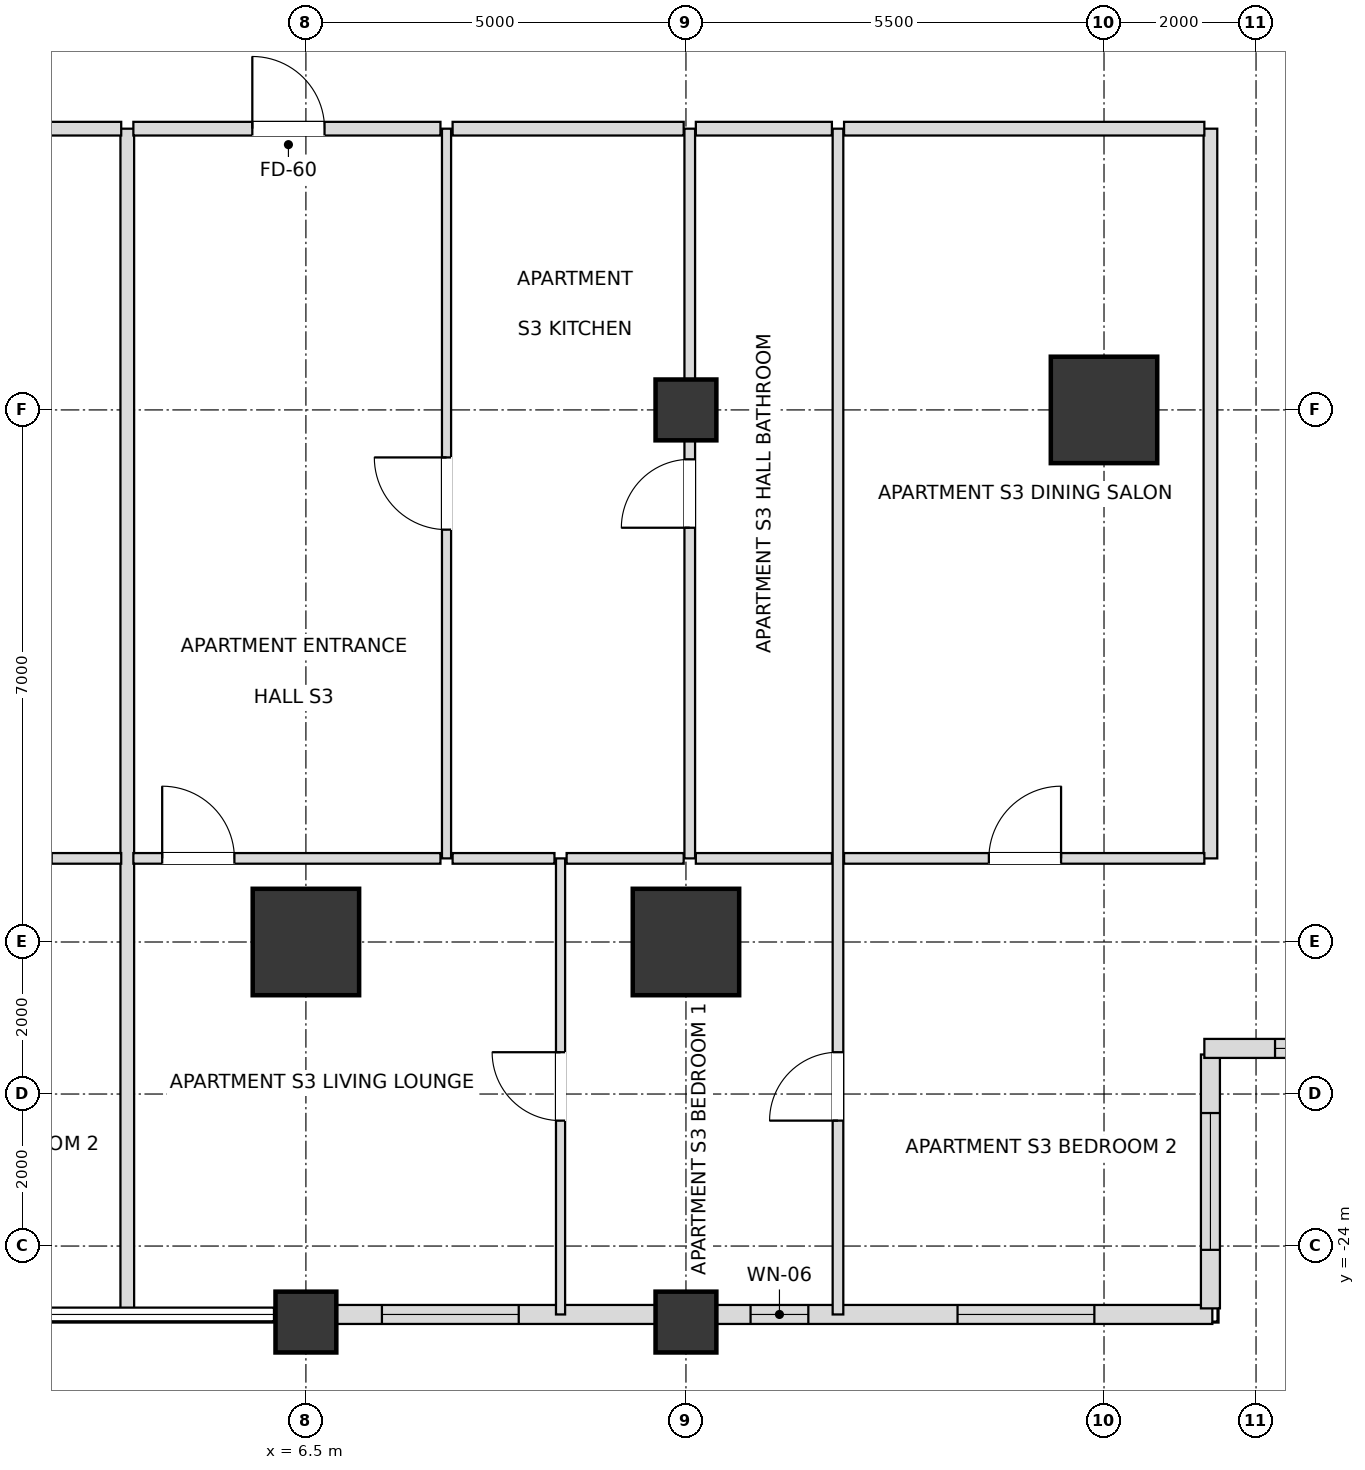
"""IFC4 building model, lengths in metres.
Left out: names, types, materials, properties, quantities, classifications, styles, units other than length and angle.
Written with IfcOpenShell. Run it as: python <this file> out.ifc"""

import sys

from ifc_helpers import new_model, si_unit, direction, frame, frame_2d, origin, origin_2d, place, context, subcontext, project, spatial, rectangle, extrude, element, fill, save


model = new_model("IFC4")
c1 = context("Model", 3, precision=1e-05, world=origin(), true_north=direction((0.0, 1.0)))
c2 = subcontext(c1, "Body", "Model", "MODEL_VIEW")
j1 = project(units=[si_unit("LENGTHUNIT", "METRE"), si_unit("PLANEANGLEUNIT", "RADIAN")], contexts=[c1])
p1 = place(None, origin())
s1 = spatial("IfcSite", under=j1, at=p1, CompositionType="ELEMENT")
p2 = place(p1, origin())
s2 = spatial("IfcBuilding", under=s1, at=p2, CompositionType="ELEMENT")
p3 = place(p2, frame((0.0, 0.0, 90.0)))
s3 = spatial("IfcBuildingStorey", under=s2, at=p3, CompositionType="ELEMENT", Elevation=90.0)
for number, where, z_axis, x_axis in (
    (1, (6.5, -20.0, 0.0), (0.0, 0.0, 1.0), (1.0, 0.0, 0.0)),
    (2, (11.5, -20.0, 0.0), (0.0, 0.0, 1.0), (1.0, 0.0, 0.0)),
    (3, (17.0, -13.0, 0.0), (0.0, 0.0, 1.0), (1.0, 0.0, 0.0)),
):
    element("IfcColumn", number, at=place(p3, frame(where, z_axis=z_axis, x_axis=x_axis)), inside=s3, PredefinedType="USERDEFINED", context=c2, shape_type="SweptSolid", body=[
        extrude(rectangle(XDim=1.4, YDim=1.4, at=origin_2d()), origin(), (0.0, 0.0, 1.0), 3.6),
    ])
for number, where, z_axis, x_axis in (
    (4, (11.5, -13.0, 0.0), (0.0, 0.0, 1.0), (1.0, 0.0, 0.0)),
    (5, (6.5, -25.0, 0.0), (0.0, 0.0, 1.0), (1.0, 0.0, 0.0)),
    (6, (11.5, -25.0, 0.0), (0.0, 0.0, 1.0), (1.0, 0.0, 0.0)),
):
    element("IfcColumn", number, at=place(p3, frame(where, z_axis=z_axis, x_axis=x_axis)), inside=s3, PredefinedType="COLUMN", context=c2, shape_type="SweptSolid", body=[
        extrude(rectangle(XDim=0.8, YDim=0.8, at=origin_2d()), origin(), (0.0, 0.0, 1.0), 3.6),
    ])
p4 = place(p3, frame((6.895, -24.9, 0.0), z_axis=(0.0, 0.0, 1.0), x_axis=(1.0, 0.0, 0.0)))
e7 = element("IfcWall", 7, at=p4, inside=s3, PredefinedType="SOLIDWALL", context=c2, shape_type="SweptSolid", body=[
    extrude(rectangle(XDim=4.21, YDim=0.25, at=frame_2d((2.105, 0.0))), origin(), (0.0, 0.0, 1.0), 2.59),
])
p5 = place(p4, frame((0.605, 0.0, 0.72)))
e8 = element("IfcOpeningElement", 8, at=p5, cuts=e7, PredefinedType="OPENING", context=c2, shape_type="SweptSolid", body=[
    extrude(rectangle(XDim=1.8, YDim=1.68, at=frame_2d((0.9, 0.84))), frame((0.0, 0.135, 0.0), z_axis=(0.0, -1.0, 0.0), x_axis=(1.0, 0.0, 0.0)), (0.0, 0.0, 1.0), 0.27),
])
p6 = place(p3, frame((11.895, -24.9, 0.0), z_axis=(0.0, 0.0, 1.0), x_axis=(1.0, 0.0, 0.0)))
e9 = element("IfcWall", 9, at=p6, inside=s3, PredefinedType="SOLIDWALL", context=c2, shape_type="SweptSolid", body=[
    extrude(rectangle(XDim=6.53, YDim=0.25, at=frame_2d((3.265, 0.0))), origin(), (0.0, 0.0, 1.0), 2.59),
])
p7 = place(p6, frame((0.455, 0.0, 0.72)))
e10 = element("IfcOpeningElement", 10, at=p7, cuts=e9, PredefinedType="OPENING", context=c2, shape_type="SweptSolid", body=[
    extrude(rectangle(XDim=0.76, YDim=1.68, at=frame_2d((0.38, 0.84))), frame((0.0, 0.135, 0.0), z_axis=(0.0, -1.0, 0.0), x_axis=(1.0, 0.0, 0.0)), (0.0, 0.0, 1.0), 0.27),
])
p8 = place(p6, frame((3.178, 0.0, 0.72)))
e11 = element("IfcOpeningElement", 11, at=p8, cuts=e9, PredefinedType="OPENING", context=c2, shape_type="SweptSolid", body=[
    extrude(rectangle(XDim=1.8, YDim=1.68, at=frame_2d((0.9, 0.84))), frame((0.0, 0.135, 0.0), z_axis=(0.0, -1.0, 0.0), x_axis=(1.0, 0.0, 0.0)), (0.0, 0.0, 1.0), 0.27),
])
p9 = place(p3, frame((18.4, -24.82, 0.0), z_axis=(0.0, 0.0, 1.0), x_axis=(0.0, 1.0, 0.0)))
e12 = element("IfcWall", 12, at=p9, inside=s3, PredefinedType="SOLIDWALL", context=c2, shape_type="SweptSolid", body=[
    extrude(rectangle(XDim=3.34, YDim=0.25, at=frame_2d((1.67, 0.0))), origin(), (0.0, 0.0, 1.0), 2.59),
])
p10 = place(p9, frame((0.77, 0.0, 0.72)))
e13 = element("IfcOpeningElement", 13, at=p10, cuts=e12, PredefinedType="OPENING", context=c2, shape_type="SweptSolid", body=[
    extrude(rectangle(XDim=1.8, YDim=1.68, at=frame_2d((0.9, 0.84))), frame((0.0, 0.135, 0.0), z_axis=(0.0, -1.0, 0.0), x_axis=(1.0, 0.0, 0.0)), (0.0, 0.0, 1.0), 0.27),
])
p11 = place(p3, frame((18.32, -21.4, 0.0), z_axis=(0.0, 0.0, 1.0), x_axis=(1.0, 0.0, 0.0)))
e14 = element("IfcWall", 14, at=p11, inside=s3, PredefinedType="SOLIDWALL", context=c2, shape_type="SweptSolid", body=[
    extrude(rectangle(XDim=3.66, YDim=0.25, at=frame_2d((1.83, 0.0))), origin(), (0.0, 0.0, 1.0), 2.59),
])
p12 = place(p11, frame((0.93, 0.0, 0.72)))
e15 = element("IfcOpeningElement", 15, at=p12, cuts=e14, PredefinedType="OPENING", context=c2, shape_type="SweptSolid", body=[
    extrude(rectangle(XDim=1.8, YDim=1.68, at=frame_2d((0.9, 0.84))), frame((0.0, 0.135, 0.0), z_axis=(0.0, -1.0, 0.0), x_axis=(1.0, 0.0, 0.0)), (0.0, 0.0, 1.0), 0.27),
])
p13 = place(p3, frame((4.15, -24.9, 0.0), z_axis=(0.0, 0.0, 1.0), x_axis=(0.0, 1.0, 0.0)))
e16 = element("IfcWall", 16, at=p13, inside=s3, PredefinedType="PARTITIONING", context=c2, shape_type="SweptSolid", body=[
    extrude(rectangle(XDim=15.6, YDim=0.18, at=frame_2d((7.8, 0.0))), origin(), (0.0, 0.0, 1.0), 2.736),
])
p14 = place(p3, frame((8.35, -18.9, 0.0), z_axis=(0.0, 0.0, 1.0), x_axis=(0.0, 1.0, 0.0)))
e17 = element("IfcWall", 17, at=p14, inside=s3, PredefinedType="PARTITIONING", context=c2, shape_type="SweptSolid", body=[
    extrude(rectangle(XDim=9.6, YDim=0.12, at=frame_2d((4.8, 0.0))), origin(), (0.0, 0.0, 1.0), 2.736),
])
p15 = place(p14, frame((4.325, 0.0, 0.0)))
e18 = element("IfcOpeningElement", 18, at=p15, cuts=e17, PredefinedType="OPENING", context=c2, shape_type="SweptSolid", body=[
    extrude(rectangle(XDim=0.95, YDim=2.1, at=frame_2d((0.475, 1.05))), frame((0.0, 0.07, 0.0), z_axis=(0.0, -1.0, 0.0), x_axis=(1.0, 0.0, 0.0)), (0.0, 0.0, 1.0), 0.14),
])
p16 = place(p3, frame((9.85, -24.9, 0.0), z_axis=(0.0, 0.0, 1.0), x_axis=(0.0, 1.0, 0.0)))
e19 = element("IfcWall", 19, at=p16, inside=s3, PredefinedType="PARTITIONING", context=c2, shape_type="SweptSolid", body=[
    extrude(rectangle(XDim=6.0, YDim=0.12, at=frame_2d((3.0, 0.0))), origin(), (0.0, 0.0, 1.0), 2.736),
])
p17 = place(p16, frame((2.55, 0.0, 0.0)))
e20 = element("IfcOpeningElement", 20, at=p17, cuts=e19, PredefinedType="OPENING", context=c2, shape_type="SweptSolid", body=[
    extrude(rectangle(XDim=0.9, YDim=2.1, at=frame_2d((0.45, 1.05))), frame((0.0, 0.07, 0.0), z_axis=(0.0, -1.0, 0.0), x_axis=(1.0, 0.0, 0.0)), (0.0, 0.0, 1.0), 0.14),
])
p18 = place(p3, frame((11.55, -18.9, 0.0), z_axis=(0.0, 0.0, 1.0), x_axis=(0.0, 1.0, 0.0)))
e21 = element("IfcWall", 21, at=p18, inside=s3, PredefinedType="PARTITIONING", context=c2, shape_type="SweptSolid", body=[
    extrude(rectangle(XDim=9.6, YDim=0.14, at=frame_2d((4.8, 0.0))), origin(), (0.0, 0.0, 1.0), 2.59),
])
p19 = place(p18, frame((4.35, 0.0, 0.0)))
e22 = element("IfcOpeningElement", 22, at=p19, cuts=e21, PredefinedType="OPENING", context=c2, shape_type="SweptSolid", body=[
    extrude(rectangle(XDim=0.9, YDim=2.1, at=frame_2d((0.45, 1.05))), frame((0.0, 0.08, 0.0), z_axis=(0.0, -1.0, 0.0), x_axis=(1.0, 0.0, 0.0)), (0.0, 0.0, 1.0), 0.16),
])
p20 = place(p3, frame((13.5, -24.9, 0.0), z_axis=(0.0, 0.0, 1.0), x_axis=(0.0, 1.0, 0.0)))
e23 = element("IfcWall", 23, at=p20, inside=s3, PredefinedType="PARTITIONING", context=c2, shape_type="SweptSolid", body=[
    extrude(rectangle(XDim=15.6, YDim=0.14, at=frame_2d((7.8, 0.0))), origin(), (0.0, 0.0, 1.0), 2.59),
])
p21 = place(p20, frame((2.55, 0.0, 0.0)))
e24 = element("IfcOpeningElement", 24, at=p21, cuts=e23, PredefinedType="OPENING", context=c2, shape_type="SweptSolid", body=[
    extrude(rectangle(XDim=0.9, YDim=2.1, at=frame_2d((0.45, 1.05))), frame((0.0, 0.08, 0.0), z_axis=(0.0, -1.0, 0.0), x_axis=(1.0, 0.0, 0.0)), (0.0, 0.0, 1.0), 0.16),
])
p22 = place(p3, frame((18.4, -18.9, 0.0), z_axis=(0.0, 0.0, 1.0), x_axis=(0.0, 1.0, 0.0)))
e25 = element("IfcWall", 25, at=p22, inside=s3, PredefinedType="PARTITIONING", context=c2, shape_type="SweptSolid", body=[
    extrude(rectangle(XDim=9.6, YDim=0.18, at=frame_2d((4.8, 0.0))), origin(), (0.0, 0.0, 1.0), 2.59),
])
p23 = place(p3, frame((1.33, -18.9, 0.0), z_axis=(0.0, 0.0, 1.0), x_axis=(1.0, 0.0, 0.0)))
e26 = element("IfcWall", 26, at=p23, inside=s3, PredefinedType="PARTITIONING", context=c2, shape_type="SweptSolid", body=[
    extrude(rectangle(XDim=2.74, YDim=0.14, at=frame_2d((1.37, 0.0))), origin(), (0.0, 0.0, 1.0), 3.3),
])
p24 = place(p23, frame((0.925, 0.0, 0.0)))
e27 = element("IfcOpeningElement", 27, at=p24, cuts=e26, PredefinedType="OPENING", context=c2, shape_type="SweptSolid", body=[
    extrude(rectangle(XDim=0.9, YDim=2.1, at=frame_2d((0.45, 1.05))), frame((0.0, 0.08, 0.0), z_axis=(0.0, -1.0, 0.0), x_axis=(1.0, 0.0, 0.0)), (0.0, 0.0, 1.0), 0.16),
])
p25 = place(p3, frame((4.23, -18.9, 0.0), z_axis=(0.0, 0.0, 1.0), x_axis=(1.0, 0.0, 0.0)))
e28 = element("IfcWall", 28, at=p25, inside=s3, PredefinedType="PARTITIONING", context=c2, shape_type="SweptSolid", body=[
    extrude(rectangle(XDim=4.04, YDim=0.14, at=frame_2d((2.02, 0.0))), origin(), (0.0, 0.0, 1.0), 2.736),
])
p26 = place(p25, frame((0.379, 0.0, 0.0)))
e29 = element("IfcOpeningElement", 29, at=p26, cuts=e28, PredefinedType="OPENING", context=c2, shape_type="SweptSolid", body=[
    extrude(rectangle(XDim=0.95, YDim=2.1, at=frame_2d((0.475, 1.05))), frame((0.0, 0.08, 0.0), z_axis=(0.0, -1.0, 0.0), x_axis=(1.0, 0.0, 0.0)), (0.0, 0.0, 1.0), 0.16),
])
p27 = place(p3, frame((8.43, -18.9, 0.0), z_axis=(0.0, 0.0, 1.0), x_axis=(1.0, 0.0, 0.0)))
e30 = element("IfcWall", 30, at=p27, inside=s3, PredefinedType="PARTITIONING", context=c2, shape_type="SweptSolid", body=[
    extrude(rectangle(XDim=1.34, YDim=0.14, at=frame_2d((0.67, 0.0))), origin(), (0.0, 0.0, 1.0), 3.3),
])
p28 = place(p3, frame((9.93, -18.9, 0.0), z_axis=(0.0, 0.0, 1.0), x_axis=(1.0, 0.0, 0.0)))
e31 = element("IfcWall", 31, at=p28, inside=s3, PredefinedType="PARTITIONING", context=c2, shape_type="SweptSolid", body=[
    extrude(rectangle(XDim=1.54, YDim=0.14, at=frame_2d((0.77, 0.0))), origin(), (0.0, 0.0, 1.0), 3.3),
])
p29 = place(p3, frame((11.63, -18.9, 0.0), z_axis=(0.0, 0.0, 1.0), x_axis=(1.0, 0.0, 0.0)))
e32 = element("IfcWall", 32, at=p29, inside=s3, PredefinedType="PARTITIONING", context=c2, shape_type="SweptSolid", body=[
    extrude(rectangle(XDim=1.79, YDim=0.14, at=frame_2d((0.895, 0.0))), origin(), (0.0, 0.0, 1.0), 2.59),
])
p30 = place(p3, frame((13.58, -18.9, 0.0), z_axis=(0.0, 0.0, 1.0), x_axis=(1.0, 0.0, 0.0)))
e33 = element("IfcWall", 33, at=p30, inside=s3, PredefinedType="PARTITIONING", context=c2, shape_type="SweptSolid", body=[
    extrude(rectangle(XDim=4.74, YDim=0.14, at=frame_2d((2.37, 0.0))), origin(), (0.0, 0.0, 1.0), 2.59),
])
p31 = place(p30, frame((1.905, 0.0, 0.0)))
e34 = element("IfcOpeningElement", 34, at=p31, cuts=e33, PredefinedType="OPENING", context=c2, shape_type="SweptSolid", body=[
    extrude(rectangle(XDim=0.95, YDim=2.1, at=frame_2d((0.475, 1.05))), frame((0.0, 0.08, 0.0), z_axis=(0.0, -1.0, 0.0), x_axis=(1.0, 0.0, 0.0)), (0.0, 0.0, 1.0), 0.16),
])
p32 = place(p3, frame((1.33, -9.3, 0.0), z_axis=(0.0, 0.0, 1.0), x_axis=(1.0, 0.0, 0.0)))
e35 = element("IfcWall", 35, at=p32, inside=s3, PredefinedType="PARTITIONING", context=c2, shape_type="SweptSolid", body=[
    extrude(rectangle(XDim=2.74, YDim=0.18, at=frame_2d((1.37, 0.0))), origin(), (0.0, 0.0, 1.0), 3.3),
])
p33 = place(p3, frame((4.23, -9.3, 0.0), z_axis=(0.0, 0.0, 1.0), x_axis=(1.0, 0.0, 0.0)))
e36 = element("IfcWall", 36, at=p33, inside=s3, PredefinedType="PARTITIONING", context=c2, shape_type="SweptSolid", body=[
    extrude(rectangle(XDim=4.04, YDim=0.18, at=frame_2d((2.02, 0.0))), origin(), (0.0, 0.0, 1.0), 2.736),
])
p34 = place(p33, frame((1.565, 0.0, 0.0)))
e37 = element("IfcOpeningElement", 37, at=p34, cuts=e36, PredefinedType="OPENING", context=c2, shape_type="SweptSolid", body=[
    extrude(rectangle(XDim=0.95, YDim=2.15, at=frame_2d((0.475, 1.075))), frame((0.0, 0.1, 0.0), z_axis=(0.0, -1.0, 0.0), x_axis=(1.0, 0.0, 0.0)), (0.0, 0.0, 1.0), 0.2),
])
p35 = place(p3, frame((8.43, -9.3, 0.0), z_axis=(0.0, 0.0, 1.0), x_axis=(1.0, 0.0, 0.0)))
e38 = element("IfcWall", 38, at=p35, inside=s3, PredefinedType="PARTITIONING", context=c2, shape_type="SweptSolid", body=[
    extrude(rectangle(XDim=3.04, YDim=0.18, at=frame_2d((1.52, 0.0))), origin(), (0.0, 0.0, 1.0), 3.3),
])
p36 = place(p3, frame((11.63, -9.3, 0.0), z_axis=(0.0, 0.0, 1.0), x_axis=(1.0, 0.0, 0.0)))
e39 = element("IfcWall", 39, at=p36, inside=s3, PredefinedType="PARTITIONING", context=c2, shape_type="SweptSolid", body=[
    extrude(rectangle(XDim=1.79, YDim=0.18, at=frame_2d((0.895, 0.0))), origin(), (0.0, 0.0, 1.0), 3.3),
])
p37 = place(p3, frame((13.58, -9.3, 0.0), z_axis=(0.0, 0.0, 1.0), x_axis=(1.0, 0.0, 0.0)))
e40 = element("IfcWall", 40, at=p37, inside=s3, PredefinedType="PARTITIONING", context=c2, shape_type="SweptSolid", body=[
    extrude(rectangle(XDim=4.74, YDim=0.18, at=frame_2d((2.37, 0.0))), origin(), (0.0, 0.0, 1.0), 2.736),
])
p38 = place(p5, origin())
e41 = element("IfcWindow", 41, at=p38, inside=s3, PartitioningType="SINGLE_PANEL", PredefinedType="WINDOW", context=c2, shape_type="SweptSolid", body=[
    extrude(rectangle(XDim=1.8, YDim=1.68, at=frame_2d((0.9, 0.84))), frame((0.0, 0.03, 0.0), z_axis=(0.0, -1.0, 0.0), x_axis=(1.0, 0.0, 0.0)), (0.0, 0.0, 1.0), 0.06),
])
fill(e8, e41)
p39 = place(p7, origin())
e42 = element("IfcWindow", 42, at=p39, inside=s3, PartitioningType="SINGLE_PANEL", PredefinedType="WINDOW", context=c2, shape_type="SweptSolid", body=[
    extrude(rectangle(XDim=0.76, YDim=1.68, at=frame_2d((0.38, 0.84))), frame((0.0, 0.03, 0.0), z_axis=(0.0, -1.0, 0.0), x_axis=(1.0, 0.0, 0.0)), (0.0, 0.0, 1.0), 0.06),
])
fill(e10, e42)
p40 = place(p8, origin())
e43 = element("IfcWindow", 43, at=p40, inside=s3, PartitioningType="SINGLE_PANEL", PredefinedType="WINDOW", context=c2, shape_type="SweptSolid", body=[
    extrude(rectangle(XDim=1.8, YDim=1.68, at=frame_2d((0.9, 0.84))), frame((0.0, 0.03, 0.0), z_axis=(0.0, -1.0, 0.0), x_axis=(1.0, 0.0, 0.0)), (0.0, 0.0, 1.0), 0.06),
])
fill(e11, e43)
p41 = place(p10, origin())
e44 = element("IfcWindow", 44, at=p41, inside=s3, PartitioningType="SINGLE_PANEL", PredefinedType="WINDOW", context=c2, shape_type="SweptSolid", body=[
    extrude(rectangle(XDim=1.8, YDim=1.68, at=frame_2d((0.9, 0.84))), frame((0.0, 0.03, 0.0), z_axis=(0.0, -1.0, 0.0), x_axis=(1.0, 0.0, 0.0)), (0.0, 0.0, 1.0), 0.06),
])
fill(e13, e44)
p42 = place(p12, origin())
e45 = element("IfcWindow", 45, at=p42, inside=s3, PartitioningType="SINGLE_PANEL", PredefinedType="WINDOW", context=c2, shape_type="SweptSolid", body=[
    extrude(rectangle(XDim=1.8, YDim=1.68, at=frame_2d((0.9, 0.84))), frame((0.0, 0.03, 0.0), z_axis=(0.0, -1.0, 0.0), x_axis=(1.0, 0.0, 0.0)), (0.0, 0.0, 1.0), 0.06),
])
fill(e15, e45)
p43 = place(p34, origin())
e46 = element("IfcDoor", 46, at=p43, inside=s3, OperationType="SINGLE_SWING_LEFT", PredefinedType="DOOR", context=c2, shape_type="SweptSolid", body=[
    extrude(rectangle(XDim=0.95, YDim=2.15, at=frame_2d((0.475, 1.075))), frame((0.0, 0.025, 0.0), z_axis=(0.0, -1.0, 0.0), x_axis=(1.0, 0.0, 0.0)), (0.0, 0.0, 1.0), 0.05),
])
fill(e37, e46)
p44 = place(p15, origin())
e47 = element("IfcDoor", 47, at=p44, inside=s3, OperationType="SINGLE_SWING_RIGHT", PredefinedType="DOOR", context=c2, shape_type="SweptSolid", body=[
    extrude(rectangle(XDim=0.95, YDim=2.1, at=frame_2d((0.475, 1.05))), frame((0.0, 0.025, 0.0), z_axis=(0.0, -1.0, 0.0), x_axis=(1.0, 0.0, 0.0)), (0.0, 0.0, 1.0), 0.05),
])
fill(e18, e47)
p45 = place(p19, origin())
e48 = element("IfcDoor", 48, at=p45, inside=s3, OperationType="SINGLE_SWING_LEFT", PredefinedType="DOOR", context=c2, shape_type="SweptSolid", body=[
    extrude(rectangle(XDim=0.9, YDim=2.1, at=frame_2d((0.45, 1.05))), frame((0.0, 0.025, 0.0), z_axis=(0.0, -1.0, 0.0), x_axis=(1.0, 0.0, 0.0)), (0.0, 0.0, 1.0), 0.05),
])
fill(e22, e48)
p46 = place(p31, origin())
e49 = element("IfcDoor", 49, at=p46, inside=s3, OperationType="SINGLE_SWING_RIGHT", PredefinedType="DOOR", context=c2, shape_type="SweptSolid", body=[
    extrude(rectangle(XDim=0.95, YDim=2.1, at=frame_2d((0.475, 1.05))), frame((0.0, 0.025, 0.0), z_axis=(0.0, -1.0, 0.0), x_axis=(1.0, 0.0, 0.0)), (0.0, 0.0, 1.0), 0.05),
])
fill(e34, e49)
p47 = place(p26, origin())
e50 = element("IfcDoor", 50, at=p47, inside=s3, OperationType="SINGLE_SWING_LEFT", PredefinedType="DOOR", context=c2, shape_type="SweptSolid", body=[
    extrude(rectangle(XDim=0.95, YDim=2.1, at=frame_2d((0.475, 1.05))), frame((0.0, 0.025, 0.0), z_axis=(0.0, -1.0, 0.0), x_axis=(1.0, 0.0, 0.0)), (0.0, 0.0, 1.0), 0.05),
])
fill(e29, e50)
p48 = place(p17, origin())
e51 = element("IfcDoor", 51, at=p48, inside=s3, OperationType="SINGLE_SWING_RIGHT", PredefinedType="DOOR", context=c2, shape_type="SweptSolid", body=[
    extrude(rectangle(XDim=0.9, YDim=2.1, at=frame_2d((0.45, 1.05))), frame((0.0, 0.025, 0.0), z_axis=(0.0, -1.0, 0.0), x_axis=(1.0, 0.0, 0.0)), (0.0, 0.0, 1.0), 0.05),
])
fill(e20, e51)
p49 = place(p21, origin())
e52 = element("IfcDoor", 52, at=p49, inside=s3, OperationType="SINGLE_SWING_LEFT", PredefinedType="DOOR", context=c2, shape_type="SweptSolid", body=[
    extrude(rectangle(XDim=0.9, YDim=2.1, at=frame_2d((0.45, 1.05))), frame((0.0, 0.025, 0.0), z_axis=(0.0, -1.0, 0.0), x_axis=(1.0, 0.0, 0.0)), (0.0, 0.0, 1.0), 0.05),
])
fill(e24, e52)
save(model, sys.argv[1])
